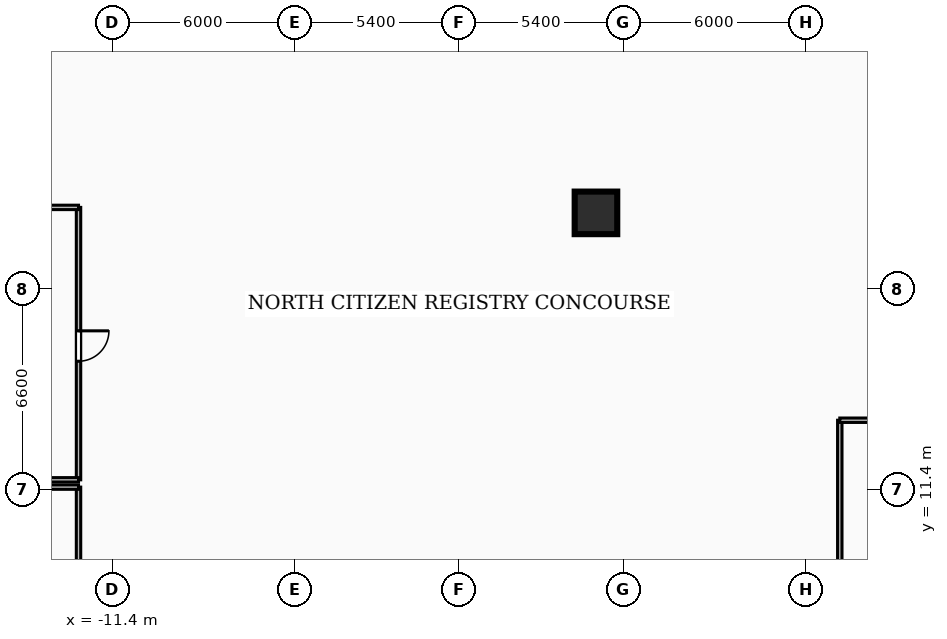
"""IFC4 building model, lengths in metres.
Left out: names, types, materials, properties, quantities, classifications, styles, units other than length and angle.
Written with IfcOpenShell. Run it as: python <this file> out.ifc"""

import sys

from ifc_helpers import new_model, si_unit, direction, frame, frame_2d, origin, origin_2d, place, context, subcontext, project, spatial, rectangle, extrude, element, fill, save


model = new_model("IFC4")
c1 = context("Model", 3, precision=1e-05, world=origin(), true_north=direction((0.0, 1.0)))
c2 = subcontext(c1, "Body", "Model", "MODEL_VIEW")
j1 = project(units=[si_unit("LENGTHUNIT", "METRE"), si_unit("PLANEANGLEUNIT", "RADIAN")], contexts=[c1])
p1 = place(None, origin())
s1 = spatial("IfcSite", under=j1, at=p1, CompositionType="ELEMENT")
p2 = place(p1, origin())
s2 = spatial("IfcBuilding", under=s1, at=p2, CompositionType="ELEMENT")
p3 = place(p2, frame((0.0, 0.0, 5.4)))
s3 = spatial("IfcBuildingStorey", under=s2, at=p3, CompositionType="ELEMENT", Elevation=5.4)
p4 = place(p3, frame((4.5, 20.5, 0.0), z_axis=(0.0, 0.0, 1.0), x_axis=(1.0, 0.0, 0.0)))
e1 = element("IfcColumn", 1, at=p4, inside=s3, PredefinedType="COLUMN", context=c2, shape_type="SweptSolid", body=[
    extrude(rectangle(XDim=1.4, YDim=1.4, at=origin_2d()), origin(), (0.0, 0.0, 1.0), 4.68),
])
p5 = place(p3, frame((-12.52, 11.48, 0.0), z_axis=(0.0, 0.0, 1.0), x_axis=(0.0, -1.0, 0.0)))
e2 = element("IfcWall", 2, at=p5, inside=s3, PredefinedType="PARTITIONING", context=c2, shape_type="SweptSolid", body=[
    extrude(rectangle(XDim=9.16, YDim=0.145, at=frame_2d((4.58, 0.0))), origin(), (0.0, 0.0, 1.0), 3.37),
])
p6 = place(p5, frame((4.16, 0.0, 0.0)))
e3 = element("IfcOpeningElement", 3, at=p6, cuts=e2, PredefinedType="OPENING", context=c2, shape_type="SweptSolid", body=[
    extrude(rectangle(XDim=1.0, YDim=2.1, at=frame_2d((0.5, 1.05))), frame((0.0, 0.083, 0.0), z_axis=(0.0, -1.0, 0.0), x_axis=(1.0, 0.0, 0.0)), (0.0, 0.0, 1.0), 0.165),
])
p7 = place(p3, frame((-22.6, 11.48, 0.0), z_axis=(0.0, 0.0, 1.0), x_axis=(1.0, 0.0, 0.0)))
e4 = element("IfcWall", 4, at=p7, inside=s3, PredefinedType="PARTITIONING", context=c2, shape_type="SweptSolid", body=[
    extrude(rectangle(XDim=10.08, YDim=0.145, at=frame_2d((5.04, 0.0))), origin(), (0.0, 0.0, 1.0), 4.36),
])
p8 = place(p3, frame((-12.52, 20.68, 0.0), z_axis=(0.0, 0.0, 1.0), x_axis=(0.0, -1.0, 0.0)))
e5 = element("IfcWall", 5, at=p8, inside=s3, PredefinedType="PARTITIONING", context=c2, shape_type="SweptSolid", body=[
    extrude(rectangle(XDim=8.96, YDim=0.145, at=frame_2d((4.48, 0.0))), origin(), (0.0, 0.0, 1.0), 3.37),
])
p9 = place(p8, frame((4.06, 0.0, 0.0)))
e6 = element("IfcOpeningElement", 6, at=p9, cuts=e5, PredefinedType="OPENING", context=c2, shape_type="SweptSolid", body=[
    extrude(rectangle(XDim=1.0, YDim=2.1, at=frame_2d((0.5, 1.05))), frame((0.0, 0.083, 0.0), z_axis=(0.0, -1.0, 0.0), x_axis=(1.0, 0.0, 0.0)), (0.0, 0.0, 1.0), 0.165),
])
p10 = place(p3, frame((-22.6, 11.72, 0.0), z_axis=(0.0, 0.0, 1.0), x_axis=(1.0, 0.0, 0.0)))
e7 = element("IfcWall", 7, at=p10, inside=s3, PredefinedType="PARTITIONING", context=c2, shape_type="SweptSolid", body=[
    extrude(rectangle(XDim=10.08, YDim=0.145, at=frame_2d((5.04, 0.0))), origin(), (0.0, 0.0, 1.0), 4.36),
])
p11 = place(p3, frame((-22.6, 20.68, 0.0), z_axis=(0.0, 0.0, 1.0), x_axis=(1.0, 0.0, 0.0)))
e8 = element("IfcWall", 8, at=p11, inside=s3, PredefinedType="PARTITIONING", context=c2, shape_type="SweptSolid", body=[
    extrude(rectangle(XDim=10.08, YDim=0.145, at=frame_2d((5.04, 0.0))), origin(), (0.0, 0.0, 1.0), 3.37),
])
p12 = place(p3, frame((12.52, 2.32, 0.0), z_axis=(0.0, 0.0, 1.0), x_axis=(0.0, 1.0, 0.0)))
e9 = element("IfcWall", 9, at=p12, inside=s3, PredefinedType="PARTITIONING", context=c2, shape_type="SweptSolid", body=[
    extrude(rectangle(XDim=11.36, YDim=0.145, at=frame_2d((5.68, 0.0))), origin(), (0.0, 0.0, 1.0), 3.37),
])
p13 = place(p12, frame((5.1, 0.0, 0.0)))
e10 = element("IfcOpeningElement", 10, at=p13, cuts=e9, PredefinedType="OPENING", context=c2, shape_type="SweptSolid", body=[
    extrude(rectangle(XDim=1.0, YDim=2.1, at=frame_2d((0.5, 1.05))), frame((0.0, 0.083, 0.0), z_axis=(0.0, -1.0, 0.0), x_axis=(1.0, 0.0, 0.0)), (0.0, 0.0, 1.0), 0.165),
])
p14 = place(p3, frame((12.52, 13.68, 0.0), z_axis=(0.0, 0.0, 1.0), x_axis=(1.0, 0.0, 0.0)))
e11 = element("IfcWall", 11, at=p14, inside=s3, PredefinedType="PARTITIONING", context=c2, shape_type="SweptSolid", body=[
    extrude(rectangle(XDim=10.08, YDim=0.145, at=frame_2d((5.04, 0.0))), origin(), (0.0, 0.0, 1.0), 4.36),
])
p15 = place(p9, origin())
e12 = element("IfcDoor", 12, at=p15, inside=s3, OperationType="SINGLE_SWING_LEFT", PredefinedType="DOOR", context=c2, shape_type="SweptSolid", body=[
    extrude(rectangle(XDim=1.0, YDim=2.1, at=frame_2d((0.5, 1.05))), frame((0.0, 0.025, 0.0), z_axis=(0.0, -1.0, 0.0), x_axis=(1.0, 0.0, 0.0)), (0.0, 0.0, 1.0), 0.05),
])
fill(e6, e12)
save(model, sys.argv[1])
